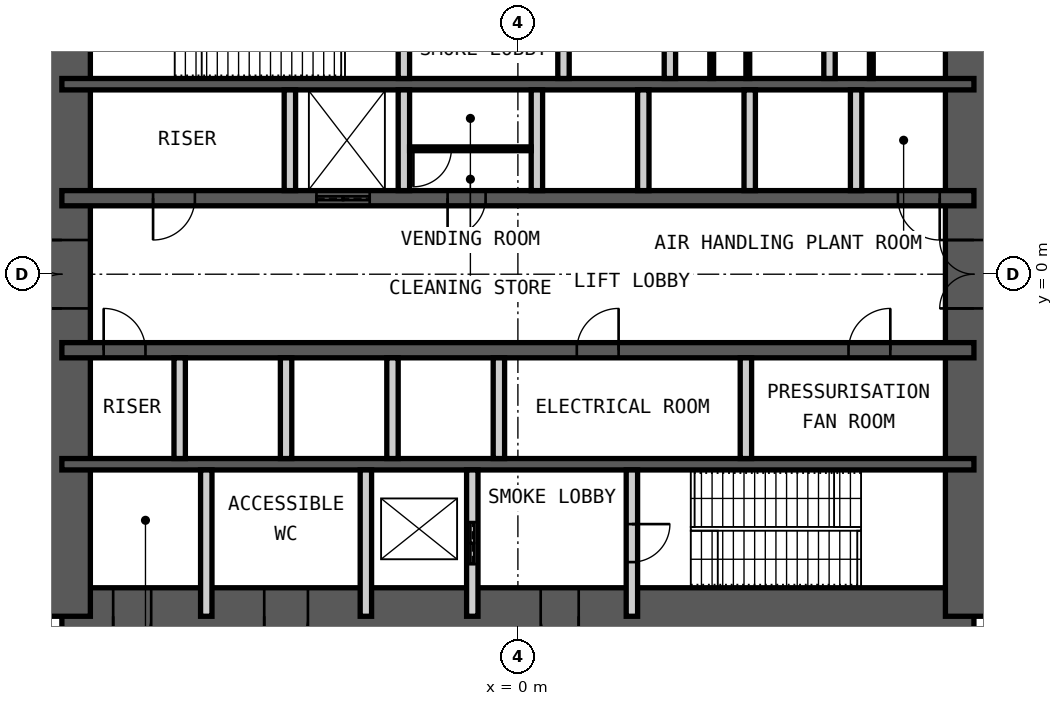
"""IFC4 building model, lengths in metres.
Left out: names, types, materials, properties, quantities, classifications, styles, units other than length and angle.
Written with IfcOpenShell. Run it as: python <this file> out.ifc"""

import sys

from ifc_helpers import new_model, si_unit, direction, frame, frame_2d, origin, place, context, subcontext, project, spatial, rectangle, extrude, element, fill, save


model = new_model("IFC4")
c1 = context("Model", 3, precision=1e-05, world=origin(), true_north=direction((0.0, 1.0)))
c2 = subcontext(c1, "Body", "Model", "MODEL_VIEW")
j1 = project(units=[si_unit("LENGTHUNIT", "METRE"), si_unit("PLANEANGLEUNIT", "RADIAN")], contexts=[c1])
p1 = place(None, origin())
s1 = spatial("IfcSite", under=j1, at=p1, CompositionType="ELEMENT")
p2 = place(p1, origin())
s2 = spatial("IfcBuilding", under=s1, at=p2, CompositionType="ELEMENT")
p3 = place(p2, frame((0.0, 0.0, -6.0)))
s3 = spatial("IfcBuildingStorey", under=s2, at=p3, CompositionType="ELEMENT", Elevation=-6.0)
p4 = place(p3, frame((-12.0, -9.0, 0.0), z_axis=(0.0, 0.0, 1.0), x_axis=(1.0, 0.0, 0.0)))
e1 = element("IfcWall", 1, at=p4, inside=s3, PredefinedType="SHEAR", context=c2, shape_type="SweptSolid", body=[
    extrude(rectangle(XDim=24.0, YDim=1.5, at=frame_2d((12.0, 0.0))), origin(), (0.0, 0.0, 1.0), 6.0),
])
p5 = place(p4, frame((1.35, 0.0, 0.0)))
e2 = element("IfcOpeningElement", 2, at=p5, cuts=e1, PredefinedType="OPENING", context=c2, shape_type="SweptSolid", body=[
    extrude(rectangle(XDim=1.0, YDim=2.1, at=frame_2d((0.5, 1.05))), frame((0.0, 0.76, 0.0), z_axis=(0.0, -1.0, 0.0), x_axis=(1.0, 0.0, 0.0)), (0.0, 0.0, 1.0), 1.52),
])
p6 = place(p4, frame((5.325, 0.0, 0.0)))
e3 = element("IfcOpeningElement", 3, at=p6, cuts=e1, PredefinedType="OPENING", context=c2, shape_type="SweptSolid", body=[
    extrude(rectangle(XDim=1.15, YDim=2.1, at=frame_2d((0.575, 1.05))), frame((0.0, 0.76, 0.0), z_axis=(0.0, -1.0, 0.0), x_axis=(1.0, 0.0, 0.0)), (0.0, 0.0, 1.0), 1.52),
])
p7 = place(p4, frame((12.6, 0.0, 0.0)))
e4 = element("IfcOpeningElement", 4, at=p7, cuts=e1, PredefinedType="OPENING", context=c2, shape_type="SweptSolid", body=[
    extrude(rectangle(XDim=1.0, YDim=2.1, at=frame_2d((0.5, 1.05))), frame((0.0, 0.76, 0.0), z_axis=(0.0, -1.0, 0.0), x_axis=(1.0, 0.0, 0.0)), (0.0, 0.0, 1.0), 1.52),
])
p8 = place(p3, frame((12.0, -9.0, 0.0), z_axis=(0.0, 0.0, 1.0), x_axis=(0.0, 1.0, 0.0)))
e5 = element("IfcWall", 5, at=p8, inside=s3, PredefinedType="SHEAR", context=c2, shape_type="SweptSolid", body=[
    extrude(rectangle(XDim=18.0, YDim=1.5, at=frame_2d((9.0, 0.0))), origin(), (0.0, 0.0, 1.0), 6.0),
])
p9 = place(p8, frame((8.1, 0.0, 0.0)))
e6 = element("IfcOpeningElement", 6, at=p9, cuts=e5, PredefinedType="OPENING", context=c2, shape_type="SweptSolid", body=[
    extrude(rectangle(XDim=1.8, YDim=2.1, at=frame_2d((0.9, 1.05))), frame((0.0, 0.76, 0.0), z_axis=(0.0, -1.0, 0.0), x_axis=(1.0, 0.0, 0.0)), (0.0, 0.0, 1.0), 1.52),
])
p10 = place(p3, frame((-12.0, -9.0, 0.0), z_axis=(0.0, 0.0, 1.0), x_axis=(0.0, 1.0, 0.0)))
e7 = element("IfcWall", 7, at=p10, inside=s3, PredefinedType="SHEAR", context=c2, shape_type="SweptSolid", body=[
    extrude(rectangle(XDim=18.0, YDim=1.5, at=frame_2d((9.0, 0.0))), origin(), (0.0, 0.0, 1.0), 6.0),
])
p11 = place(p10, frame((8.1, 0.0, 0.0)))
e8 = element("IfcOpeningElement", 8, at=p11, cuts=e7, PredefinedType="OPENING", context=c2, shape_type="SweptSolid", body=[
    extrude(rectangle(XDim=1.8, YDim=2.1, at=frame_2d((0.9, 1.05))), frame((0.0, 0.76, 0.0), z_axis=(0.0, -1.0, 0.0), x_axis=(1.0, 0.0, 0.0)), (0.0, 0.0, 1.0), 1.52),
])
p12 = place(p3, frame((-12.0, 5.0, 0.0), z_axis=(0.0, 0.0, 1.0), x_axis=(1.0, 0.0, 0.0)))
e9 = element("IfcWall", 9, at=p12, inside=s3, PredefinedType="SHEAR", context=c2, shape_type="SweptSolid", body=[
    extrude(rectangle(XDim=24.0, YDim=0.3, at=frame_2d((12.0, 0.0))), origin(), (0.0, 0.0, 1.0), 6.0),
])
p13 = place(p3, frame((-12.0, 2.0, 0.0), z_axis=(0.0, 0.0, 1.0), x_axis=(1.0, 0.0, 0.0)))
e10 = element("IfcWall", 10, at=p13, inside=s3, PredefinedType="SHEAR", context=c2, shape_type="SweptSolid", body=[
    extrude(rectangle(XDim=24.0, YDim=0.4, at=frame_2d((12.0, 0.0))), origin(), (0.0, 0.0, 1.0), 6.0),
])
p14 = place(p13, frame((2.4, 0.0, 0.0)))
e11 = element("IfcOpeningElement", 11, at=p14, cuts=e10, PredefinedType="OPENING", context=c2, shape_type="SweptSolid", body=[
    extrude(rectangle(XDim=1.1, YDim=2.1, at=frame_2d((0.55, 1.05))), frame((0.0, 0.21, 0.0), z_axis=(0.0, -1.0, 0.0), x_axis=(1.0, 0.0, 0.0)), (0.0, 0.0, 1.0), 0.42),
])
p15 = place(p13, frame((22.0, 0.0, 0.0)))
e12 = element("IfcOpeningElement", 12, at=p15, cuts=e10, PredefinedType="OPENING", context=c2, shape_type="SweptSolid", body=[
    extrude(rectangle(XDim=1.1, YDim=2.1, at=frame_2d((0.55, 1.05))), frame((0.0, 0.21, 0.0), z_axis=(0.0, -1.0, 0.0), x_axis=(1.0, 0.0, 0.0)), (0.0, 0.0, 1.0), 0.42),
])
p16 = place(p13, frame((10.15, 0.0, 0.0)))
e13 = element("IfcOpeningElement", 13, at=p16, cuts=e10, PredefinedType="OPENING", context=c2, shape_type="SweptSolid", body=[
    extrude(rectangle(XDim=1.0, YDim=2.1, at=frame_2d((0.5, 1.05))), frame((0.0, 0.21, 0.0), z_axis=(0.0, -1.0, 0.0), x_axis=(1.0, 0.0, 0.0)), (0.0, 0.0, 1.0), 0.42),
])
p17 = place(p13, frame((6.7, 0.0, 0.0)))
e14 = element("IfcOpeningElement", 14, at=p17, cuts=e10, PredefinedType="OPENING", context=c2, shape_type="SweptSolid", body=[
    extrude(rectangle(XDim=1.4, YDim=2.4, at=frame_2d((0.7, 1.2))), frame((0.0, 0.21, 0.0), z_axis=(0.0, -1.0, 0.0), x_axis=(1.0, 0.0, 0.0)), (0.0, 0.0, 1.0), 0.42),
])
p18 = place(p3, frame((-12.0, -2.0, 0.0), z_axis=(0.0, 0.0, 1.0), x_axis=(1.0, 0.0, 0.0)))
e15 = element("IfcWall", 15, at=p18, inside=s3, PredefinedType="SHEAR", context=c2, shape_type="SweptSolid", body=[
    extrude(rectangle(XDim=24.0, YDim=0.4, at=frame_2d((12.0, 0.0))), origin(), (0.0, 0.0, 1.0), 6.0),
])
p19 = place(p18, frame((1.1, 0.0, 0.0)))
e16 = element("IfcOpeningElement", 16, at=p19, cuts=e15, PredefinedType="OPENING", context=c2, shape_type="SweptSolid", body=[
    extrude(rectangle(XDim=1.1, YDim=2.1, at=frame_2d((0.55, 1.05))), frame((0.0, 0.21, 0.0), z_axis=(0.0, -1.0, 0.0), x_axis=(1.0, 0.0, 0.0)), (0.0, 0.0, 1.0), 0.42),
])
p20 = place(p18, frame((13.55, 0.0, 0.0)))
e17 = element("IfcOpeningElement", 17, at=p20, cuts=e15, PredefinedType="OPENING", context=c2, shape_type="SweptSolid", body=[
    extrude(rectangle(XDim=1.1, YDim=2.1, at=frame_2d((0.55, 1.05))), frame((0.0, 0.21, 0.0), z_axis=(0.0, -1.0, 0.0), x_axis=(1.0, 0.0, 0.0)), (0.0, 0.0, 1.0), 0.42),
])
p21 = place(p18, frame((20.7, 0.0, 0.0)))
e18 = element("IfcOpeningElement", 18, at=p21, cuts=e15, PredefinedType="OPENING", context=c2, shape_type="SweptSolid", body=[
    extrude(rectangle(XDim=1.1, YDim=2.1, at=frame_2d((0.55, 1.05))), frame((0.0, 0.21, 0.0), z_axis=(0.0, -1.0, 0.0), x_axis=(1.0, 0.0, 0.0)), (0.0, 0.0, 1.0), 0.42),
])
p22 = place(p3, frame((-12.0, -5.0, 0.0), z_axis=(0.0, 0.0, 1.0), x_axis=(1.0, 0.0, 0.0)))
e19 = element("IfcWall", 19, at=p22, inside=s3, PredefinedType="SHEAR", context=c2, shape_type="SweptSolid", body=[
    extrude(rectangle(XDim=24.0, YDim=0.3, at=frame_2d((12.0, 0.0))), origin(), (0.0, 0.0, 1.0), 6.0),
])
p23 = place(p3, frame((-3.0, 5.15, 0.0), z_axis=(0.0, 0.0, 1.0), x_axis=(0.0, 1.0, 0.0)))
e20 = element("IfcWall", 20, at=p23, inside=s3, PredefinedType="PARTITIONING", context=c2, shape_type="SweptSolid", body=[
    extrude(rectangle(XDim=3.85, YDim=0.3, at=frame_2d((1.925, 0.0))), origin(), (0.0, 0.0, 1.0), 5.78),
])
p24 = place(p23, frame((1.425, 0.0, 0.0)))
e21 = element("IfcOpeningElement", 21, at=p24, cuts=e20, PredefinedType="OPENING", context=c2, shape_type="SweptSolid", body=[
    extrude(rectangle(XDim=1.0, YDim=2.1, at=frame_2d((0.5, 1.05))), frame((0.0, 0.16, 0.0), z_axis=(0.0, -1.0, 0.0), x_axis=(1.0, 0.0, 0.0)), (0.0, 0.0, 1.0), 0.32),
])
p25 = place(p3, frame((1.2, 5.15, 0.0), z_axis=(0.0, 0.0, 1.0), x_axis=(0.0, 1.0, 0.0)))
e22 = element("IfcWall", 22, at=p25, inside=s3, PredefinedType="PARTITIONING", context=c2, shape_type="SweptSolid", body=[
    extrude(rectangle(XDim=3.85, YDim=0.3, at=frame_2d((1.925, 0.0))), origin(), (0.0, 0.0, 1.0), 5.78),
])
p26 = place(p25, frame((1.375, 0.0, 0.0)))
e23 = element("IfcOpeningElement", 23, at=p26, cuts=e22, PredefinedType="OPENING", context=c2, shape_type="SweptSolid", body=[
    extrude(rectangle(XDim=1.1, YDim=2.4, at=frame_2d((0.55, 1.2))), frame((0.0, 0.16, 0.0), z_axis=(0.0, -1.0, 0.0), x_axis=(1.0, 0.0, 0.0)), (0.0, 0.0, 1.0), 0.32),
])
for number, where, z_axis, x_axis in (
    (24, (4.0, 5.15, 0.0), (0.0, 0.0, 1.0), (0.0, 1.0, 0.0)),
    (25, (8.2, 5.15, 0.0), (0.0, 0.0, 1.0), (0.0, 1.0, 0.0)),
):
    element("IfcWall", number, at=place(p3, frame(where, z_axis=z_axis, x_axis=x_axis)), inside=s3, PredefinedType="PARTITIONING", context=c2, shape_type="SweptSolid", body=[
        extrude(rectangle(XDim=3.85, YDim=0.3, at=frame_2d((1.925, 0.0))), origin(), (0.0, 0.0, 1.0), 5.78),
    ])
for number, where, z_axis, x_axis in (
    (26, (-6.0, 2.2, 0.0), (0.0, 0.0, 1.0), (0.0, 1.0, 0.0)),
    (27, (-3.0, 2.2, 0.0), (0.0, 0.0, 1.0), (0.0, 1.0, 0.0)),
    (28, (0.5, 2.2, 0.0), (0.0, 0.0, 1.0), (0.0, 1.0, 0.0)),
    (29, (3.3, 2.2, 0.0), (0.0, 0.0, 1.0), (0.0, 1.0, 0.0)),
    (30, (6.1, 2.2, 0.0), (0.0, 0.0, 1.0), (0.0, 1.0, 0.0)),
    (31, (8.9, 2.2, 0.0), (0.0, 0.0, 1.0), (0.0, 1.0, 0.0)),
    (32, (-8.9, -4.85, 0.0), (0.0, 0.0, 1.0), (0.0, 1.0, 0.0)),
    (33, (-6.1, -4.85, 0.0), (0.0, 0.0, 1.0), (0.0, 1.0, 0.0)),
    (34, (-3.3, -4.85, 0.0), (0.0, 0.0, 1.0), (0.0, 1.0, 0.0)),
    (35, (-0.5, -4.85, 0.0), (0.0, 0.0, 1.0), (0.0, 1.0, 0.0)),
    (36, (6.0, -4.85, 0.0), (0.0, 0.0, 1.0), (0.0, 1.0, 0.0)),
):
    element("IfcWall", number, at=place(p3, frame(where, z_axis=z_axis, x_axis=x_axis)), inside=s3, PredefinedType="PARTITIONING", context=c2, shape_type="SweptSolid", body=[
        extrude(rectangle(XDim=2.65, YDim=0.3, at=frame_2d((1.325, 0.0))), origin(), (0.0, 0.0, 1.0), 5.78),
    ])
for number, where, z_axis, x_axis in (
    (37, (-8.2, -9.0, 0.0), (0.0, 0.0, 1.0), (0.0, 1.0, 0.0)),
    (38, (-4.0, -9.0, 0.0), (0.0, 0.0, 1.0), (0.0, 1.0, 0.0)),
):
    element("IfcWall", number, at=place(p3, frame(where, z_axis=z_axis, x_axis=x_axis)), inside=s3, PredefinedType="PARTITIONING", context=c2, shape_type="SweptSolid", body=[
        extrude(rectangle(XDim=3.85, YDim=0.3, at=frame_2d((1.925, 0.0))), origin(), (0.0, 0.0, 1.0), 5.78),
    ])
p27 = place(p3, frame((-1.2, -9.0, 0.0), z_axis=(0.0, 0.0, 1.0), x_axis=(0.0, 1.0, 0.0)))
e39 = element("IfcWall", 39, at=p27, inside=s3, PredefinedType="PARTITIONING", context=c2, shape_type="SweptSolid", body=[
    extrude(rectangle(XDim=3.85, YDim=0.3, at=frame_2d((1.925, 0.0))), origin(), (0.0, 0.0, 1.0), 5.78),
])
p28 = place(p27, frame((1.375, 0.0, 0.0)))
e40 = element("IfcOpeningElement", 40, at=p28, cuts=e39, PredefinedType="OPENING", context=c2, shape_type="SweptSolid", body=[
    extrude(rectangle(XDim=1.1, YDim=2.4, at=frame_2d((0.55, 1.2))), frame((0.0, 0.16, 0.0), z_axis=(0.0, -1.0, 0.0), x_axis=(1.0, 0.0, 0.0)), (0.0, 0.0, 1.0), 0.32),
])
p29 = place(p3, frame((3.0, -9.0, 0.0), z_axis=(0.0, 0.0, 1.0), x_axis=(0.0, 1.0, 0.0)))
e41 = element("IfcWall", 41, at=p29, inside=s3, PredefinedType="PARTITIONING", context=c2, shape_type="SweptSolid", body=[
    extrude(rectangle(XDim=3.85, YDim=0.3, at=frame_2d((1.925, 0.0))), origin(), (0.0, 0.0, 1.0), 5.78),
])
p30 = place(p29, frame((1.425, 0.0, 0.0)))
e42 = element("IfcOpeningElement", 42, at=p30, cuts=e41, PredefinedType="OPENING", context=c2, shape_type="SweptSolid", body=[
    extrude(rectangle(XDim=1.0, YDim=2.1, at=frame_2d((0.5, 1.05))), frame((0.0, 0.16, 0.0), z_axis=(0.0, -1.0, 0.0), x_axis=(1.0, 0.0, 0.0)), (0.0, 0.0, 1.0), 0.32),
])
p31 = place(p3, frame((-2.85, 3.3, 0.0), z_axis=(0.0, 0.0, 1.0), x_axis=(1.0, 0.0, 0.0)))
e43 = element("IfcWall", 43, at=p31, inside=s3, PredefinedType="PARTITIONING", context=c2, shape_type="SweptSolid", body=[
    extrude(rectangle(XDim=3.2, YDim=0.1, at=frame_2d((1.6, 0.0))), origin(), (0.0, 0.0, 1.0), 5.78),
])
p32 = place(p31, frame((0.1, 0.0, 0.0)))
e44 = element("IfcOpeningElement", 44, at=p32, cuts=e43, PredefinedType="OPENING", context=c2, shape_type="SweptSolid", body=[
    extrude(rectangle(XDim=1.0, YDim=2.4, at=frame_2d((0.5, 1.2))), frame((0.0, 0.06, 0.0), z_axis=(0.0, -1.0, 0.0), x_axis=(1.0, 0.0, 0.0)), (0.0, 0.0, 1.0), 0.12),
])
for number, where, z_axis, x_axis in (
    (45, (5.1, 5.15, 0.0), (0.0, 0.0, 1.0), (0.0, 1.0, 0.0)),
    (46, (6.05, 5.15, 0.0), (0.0, 0.0, 1.0), (0.0, 1.0, 0.0)),
    (47, (9.3, 5.15, 0.0), (0.0, 0.0, 1.0), (0.0, 1.0, 0.0)),
):
    element("IfcWall", number, at=place(p3, frame(where, z_axis=z_axis, x_axis=x_axis)), inside=s3, PredefinedType="PARTITIONING", context=c2, shape_type="SweptSolid", body=[
        extrude(rectangle(XDim=1.5, YDim=0.1, at=frame_2d((0.75, 0.0))), origin(), (0.0, 0.0, 1.0), 2.1),
    ])
p33 = place(p5, origin())
e48 = element("IfcDoor", 48, at=p33, inside=s3, OperationType="SINGLE_SWING_LEFT", PredefinedType="DOOR", context=c2, shape_type="SweptSolid", body=[
    extrude(rectangle(XDim=1.0, YDim=2.1, at=frame_2d((0.5, 1.05))), frame((0.0, 0.025, 0.0), z_axis=(0.0, -1.0, 0.0), x_axis=(1.0, 0.0, 0.0)), (0.0, 0.0, 1.0), 0.05),
])
fill(e2, e48)
p34 = place(p6, origin())
e49 = element("IfcDoor", 49, at=p34, inside=s3, OperationType="SINGLE_SWING_LEFT", PredefinedType="DOOR", context=c2, shape_type="SweptSolid", body=[
    extrude(rectangle(XDim=1.15, YDim=2.1, at=frame_2d((0.575, 1.05))), frame((0.0, 0.025, 0.0), z_axis=(0.0, -1.0, 0.0), x_axis=(1.0, 0.0, 0.0)), (0.0, 0.0, 1.0), 0.05),
])
fill(e3, e49)
p35 = place(p7, origin())
e50 = element("IfcDoor", 50, at=p35, inside=s3, OperationType="SINGLE_SWING_RIGHT", PredefinedType="DOOR", context=c2, shape_type="SweptSolid", body=[
    extrude(rectangle(XDim=1.0, YDim=2.1, at=frame_2d((0.5, 1.05))), frame((0.0, 0.025, 0.0), z_axis=(0.0, -1.0, 0.0), x_axis=(1.0, 0.0, 0.0)), (0.0, 0.0, 1.0), 0.05),
])
fill(e4, e50)
p36 = place(p30, origin())
e51 = element("IfcDoor", 51, at=p36, inside=s3, OperationType="SINGLE_SWING_RIGHT", PredefinedType="DOOR", context=c2, shape_type="SweptSolid", body=[
    extrude(rectangle(XDim=1.0, YDim=2.1, at=frame_2d((0.5, 1.05))), frame((0.0, 0.025, 0.0), z_axis=(0.0, -1.0, 0.0), x_axis=(1.0, 0.0, 0.0)), (0.0, 0.0, 1.0), 0.05),
])
fill(e42, e51)
p37 = place(p14, origin())
e52 = element("IfcDoor", 52, at=p37, inside=s3, OperationType="SINGLE_SWING_LEFT", PredefinedType="DOOR", context=c2, shape_type="SweptSolid", body=[
    extrude(rectangle(XDim=1.1, YDim=2.1, at=frame_2d((0.55, 1.05))), frame((0.0, 0.025, 0.0), z_axis=(0.0, -1.0, 0.0), x_axis=(1.0, 0.0, 0.0)), (0.0, 0.0, 1.0), 0.05),
])
fill(e11, e52)
p38 = place(p19, origin())
e53 = element("IfcDoor", 53, at=p38, inside=s3, OperationType="SINGLE_SWING_RIGHT", PredefinedType="DOOR", context=c2, shape_type="SweptSolid", body=[
    extrude(rectangle(XDim=1.1, YDim=2.1, at=frame_2d((0.55, 1.05))), frame((0.0, 0.025, 0.0), z_axis=(0.0, -1.0, 0.0), x_axis=(1.0, 0.0, 0.0)), (0.0, 0.0, 1.0), 0.05),
])
fill(e16, e53)
p39 = place(p15, origin())
e54 = element("IfcDoor", 54, at=p39, inside=s3, OperationType="SINGLE_SWING_RIGHT", PredefinedType="DOOR", context=c2, shape_type="SweptSolid", body=[
    extrude(rectangle(XDim=1.1, YDim=2.1, at=frame_2d((0.55, 1.05))), frame((0.0, 0.025, 0.0), z_axis=(0.0, -1.0, 0.0), x_axis=(1.0, 0.0, 0.0)), (0.0, 0.0, 1.0), 0.05),
])
fill(e12, e54)
p40 = place(p16, origin())
e55 = element("IfcDoor", 55, at=p40, inside=s3, OperationType="SINGLE_SWING_LEFT", PredefinedType="DOOR", context=c2, shape_type="SweptSolid", body=[
    extrude(rectangle(XDim=1.0, YDim=2.1, at=frame_2d((0.5, 1.05))), frame((0.0, 0.025, 0.0), z_axis=(0.0, -1.0, 0.0), x_axis=(1.0, 0.0, 0.0)), (0.0, 0.0, 1.0), 0.05),
])
fill(e13, e55)
p41 = place(p20, origin())
e56 = element("IfcDoor", 56, at=p41, inside=s3, OperationType="SINGLE_SWING_LEFT", PredefinedType="DOOR", context=c2, shape_type="SweptSolid", body=[
    extrude(rectangle(XDim=1.1, YDim=2.1, at=frame_2d((0.55, 1.05))), frame((0.0, 0.025, 0.0), z_axis=(0.0, -1.0, 0.0), x_axis=(1.0, 0.0, 0.0)), (0.0, 0.0, 1.0), 0.05),
])
fill(e17, e56)
p42 = place(p21, origin())
e57 = element("IfcDoor", 57, at=p42, inside=s3, OperationType="SINGLE_SWING_LEFT", PredefinedType="DOOR", context=c2, shape_type="SweptSolid", body=[
    extrude(rectangle(XDim=1.1, YDim=2.1, at=frame_2d((0.55, 1.05))), frame((0.0, 0.025, 0.0), z_axis=(0.0, -1.0, 0.0), x_axis=(1.0, 0.0, 0.0)), (0.0, 0.0, 1.0), 0.05),
])
fill(e18, e57)
p43 = place(p9, origin())
e58 = element("IfcDoor", 58, at=p43, inside=s3, OperationType="DOUBLE_DOOR_DOUBLE_SWING", PredefinedType="DOOR", context=c2, shape_type="SweptSolid", body=[
    extrude(rectangle(XDim=1.8, YDim=2.1, at=frame_2d((0.9, 1.05))), frame((0.0, 0.025, 0.0), z_axis=(0.0, -1.0, 0.0), x_axis=(1.0, 0.0, 0.0)), (0.0, 0.0, 1.0), 0.05),
])
fill(e6, e58)
p44 = place(p11, origin())
e59 = element("IfcDoor", 59, at=p44, inside=s3, OperationType="DOUBLE_DOOR_DOUBLE_SWING", PredefinedType="DOOR", context=c2, shape_type="SweptSolid", body=[
    extrude(rectangle(XDim=1.8, YDim=2.1, at=frame_2d((0.9, 1.05))), frame((0.0, 0.025, 0.0), z_axis=(0.0, -1.0, 0.0), x_axis=(1.0, 0.0, 0.0)), (0.0, 0.0, 1.0), 0.05),
])
fill(e8, e59)
p45 = place(p28, origin())
e60 = element("IfcDoor", 60, at=p45, inside=s3, OperationType="DOUBLE_DOOR_SLIDING", PredefinedType="DOOR", context=c2, shape_type="SweptSolid", body=[
    extrude(rectangle(XDim=1.1, YDim=2.4, at=frame_2d((0.55, 1.2))), frame((0.0, 0.025, 0.0), z_axis=(0.0, -1.0, 0.0), x_axis=(1.0, 0.0, 0.0)), (0.0, 0.0, 1.0), 0.05),
])
fill(e40, e60)
p46 = place(p17, origin())
e61 = element("IfcDoor", 61, at=p46, inside=s3, OperationType="DOUBLE_DOOR_SLIDING", PredefinedType="DOOR", context=c2, shape_type="SweptSolid", body=[
    extrude(rectangle(XDim=1.4, YDim=2.4, at=frame_2d((0.7, 1.2))), frame((0.0, 0.025, 0.0), z_axis=(0.0, -1.0, 0.0), x_axis=(1.0, 0.0, 0.0)), (0.0, 0.0, 1.0), 0.05),
])
fill(e14, e61)
p47 = place(p32, origin())
e62 = element("IfcDoor", 62, at=p47, inside=s3, OperationType="SINGLE_SWING_LEFT", PredefinedType="DOOR", context=c2, shape_type="SweptSolid", body=[
    extrude(rectangle(XDim=1.0, YDim=2.4, at=frame_2d((0.5, 1.2))), frame((0.0, 0.025, 0.0), z_axis=(0.0, -1.0, 0.0), x_axis=(1.0, 0.0, 0.0)), (0.0, 0.0, 1.0), 0.05),
])
fill(e44, e62)
save(model, sys.argv[1])
